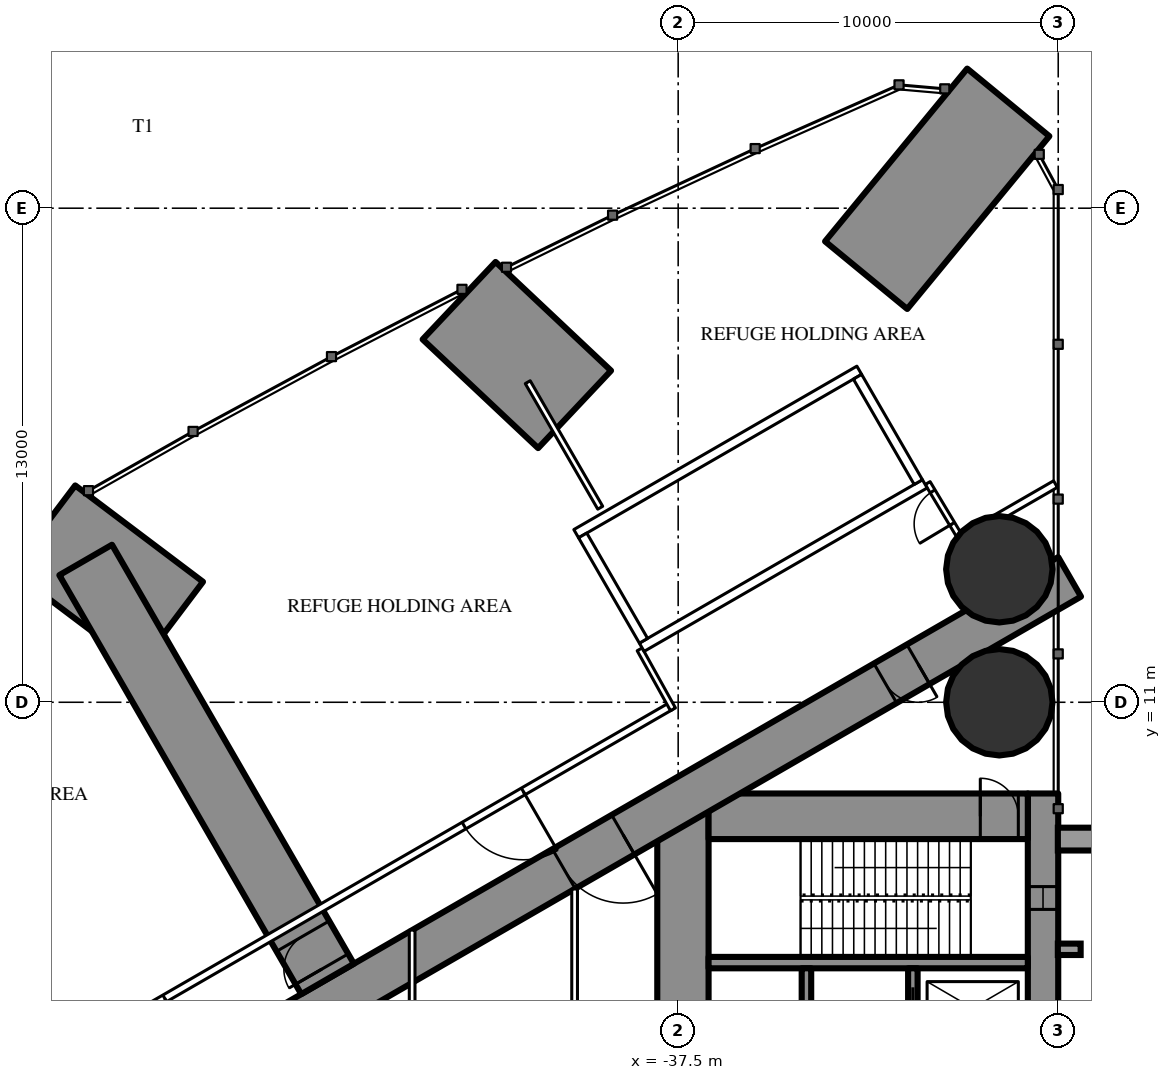
"""IFC4 building model, lengths in metres.
Left out: names, types, materials, properties, quantities, classifications, styles, units other than length and angle.
Written with IfcOpenShell. Run it as: python <this file> out.ifc"""

import sys

from ifc_helpers import new_model, si_unit, direction, frame, frame_2d, origin, origin_2d, place, context, subcontext, project, spatial, rectangle, hollow_circle, extrude, element, fill, save


model = new_model("IFC4")
c1 = context("Model", 3, precision=1e-05, world=origin(), true_north=direction((0.0, 1.0)))
c2 = subcontext(c1, "Body", "Model", "MODEL_VIEW")
j1 = project(units=[si_unit("LENGTHUNIT", "METRE"), si_unit("PLANEANGLEUNIT", "RADIAN")], contexts=[c1])
p1 = place(None, origin())
s1 = spatial("IfcSite", under=j1, at=p1, CompositionType="ELEMENT")
p2 = place(p1, origin())
s2 = spatial("IfcBuilding", under=s1, at=p2, CompositionType="ELEMENT")
p3 = place(p2, frame((0.0, 0.0, 81.0)))
s3 = spatial("IfcBuildingStorey", under=s2, at=p3, CompositionType="ELEMENT", Elevation=81.0)
p4 = place(p3, frame((-28.814, 26.784, 0.0), z_axis=(0.0, 0.0, 1.0), x_axis=(-0.635272533776, -0.77228803424, 0.0)))
e1 = element("IfcWall", 1, at=p4, inside=s3, PredefinedType="SHEAR", context=c2, shape_type="SweptSolid", body=[
    extrude(rectangle(XDim=5.887, YDim=2.8, at=frame_2d((2.944, 0.0))), origin(), (0.0, 0.0, 1.0), 6.0),
])
for number, where, z_axis, x_axis in (
    (2, (-29.05, 11.0, 0.0), (0.0, 0.0, 1.0), (1.0, 0.0, 0.0)),
    (3, (-29.05, 14.5, 0.0), (0.0, 0.0, 1.0), (1.0, 0.0, 0.0)),
):
    element("IfcColumn", number, at=place(p3, frame(where, z_axis=z_axis, x_axis=x_axis)), inside=s3, PredefinedType="COLUMN", context=c2, shape_type="SweptSolid", body=[
        extrude(hollow_circle(Radius=1.4, WallThickness=0.12, at=origin_2d()), origin(), (0.0, 0.0, 1.0), 6.0),
    ])
p5 = place(p3, frame((-43.265, 21.567, 0.0), z_axis=(0.0, 0.0, 1.0), x_axis=(0.728105540353, -0.685465040762, 0.0)))
e4 = element("IfcWall", 4, at=p5, inside=s3, PredefinedType="SHEAR", context=c2, shape_type="SweptSolid", body=[
    extrude(rectangle(XDim=4.174, YDim=2.8, at=frame_2d((2.087, 0.0))), origin(), (0.0, 0.0, 1.0), 6.0),
])
p6 = place(p3, frame((-54.208, 15.588, 0.0), z_axis=(0.0, 0.0, 1.0), x_axis=(0.798432065831, -0.602084907843, 0.0)))
e5 = element("IfcWall", 5, at=p6, inside=s3, PredefinedType="SHEAR", context=c2, shape_type="SweptSolid", body=[
    extrude(rectangle(XDim=4.211, YDim=2.8, at=frame_2d((2.106, 0.0))), origin(), (0.0, 0.0, 1.0), 6.0),
])
p7 = place(p3, frame((-27.9, 8.6, 0.0), z_axis=(0.0, 0.0, 1.0), x_axis=(0.0, -1.0, 0.0)))
e6 = element("IfcWall", 6, at=p7, inside=s3, PredefinedType="SHEAR", context=c2, shape_type="SweptSolid", body=[
    extrude(rectangle(XDim=17.2, YDim=0.8, at=frame_2d((8.6, 0.0))), origin(), (0.0, 0.0, 1.0), 6.0),
])
p8 = place(p7, frame((2.45, 0.0, 0.6)))
e7 = element("IfcOpeningElement", 7, at=p8, cuts=e6, PredefinedType="OPENING", context=c2, shape_type="SweptSolid", body=[
    extrude(rectangle(XDim=0.6, YDim=4.5, at=frame_2d((0.3, 2.25))), frame((0.0, 0.41, 0.0), z_axis=(0.0, -1.0, 0.0), x_axis=(1.0, 0.0, 0.0)), (0.0, 0.0, 1.0), 0.82),
])
p9 = place(p7, frame((14.15, 0.0, 0.6)))
e8 = element("IfcOpeningElement", 8, at=p9, cuts=e6, PredefinedType="OPENING", context=c2, shape_type="SweptSolid", body=[
    extrude(rectangle(XDim=0.6, YDim=4.5, at=frame_2d((0.3, 2.25))), frame((0.0, 0.41, 0.0), z_axis=(0.0, -1.0, 0.0), x_axis=(1.0, 0.0, 0.0)), (0.0, 0.0, 1.0), 0.82),
])
p10 = place(p3, frame((-37.375, 8.6, 0.0), z_axis=(0.0, 0.0, 1.0), x_axis=(0.0, -1.0, 0.0)))
e9 = element("IfcWall", 9, at=p10, inside=s3, PredefinedType="SHEAR", context=c2, shape_type="SweptSolid", body=[
    extrude(rectangle(XDim=17.2, YDim=1.35, at=frame_2d((8.6, 0.0))), origin(), (0.0, 0.0, 1.0), 6.0),
])
p11 = place(p10, frame((7.7, 0.0, 0.0)))
e10 = element("IfcOpeningElement", 10, at=p11, cuts=e9, PredefinedType="OPENING", context=c2, shape_type="SweptSolid", body=[
    extrude(rectangle(XDim=1.8, YDim=2.2, at=frame_2d((0.9, 1.1))), frame((0.0, 0.685, 0.0), z_axis=(0.0, -1.0, 0.0), x_axis=(1.0, 0.0, 0.0)), (0.0, 0.0, 1.0), 1.37),
])
p12 = place(p3, frame((-28.3, 8.0, 0.0), z_axis=(0.0, 0.0, 1.0), x_axis=(-1.0, 0.0, 0.0)))
e11 = element("IfcWall", 11, at=p12, inside=s3, PredefinedType="SHEAR", context=c2, shape_type="SweptSolid", body=[
    extrude(rectangle(XDim=8.4, YDim=1.2, at=frame_2d((4.2, 0.0))), origin(), (0.0, 0.0, 1.0), 6.0),
])
p13 = place(p12, frame((0.25, 0.0, 0.0)))
e12 = element("IfcOpeningElement", 12, at=p13, cuts=e11, PredefinedType="OPENING", context=c2, shape_type="SweptSolid", body=[
    extrude(rectangle(XDim=1.0, YDim=2.2, at=frame_2d((0.5, 1.1))), frame((0.0, 0.61, 0.0), z_axis=(0.0, -1.0, 0.0), x_axis=(1.0, 0.0, 0.0)), (0.0, 0.0, 1.0), 1.22),
])
p14 = place(p3, frame((-28.3, 4.15, 0.0), z_axis=(0.0, 0.0, 1.0), x_axis=(-1.0, 0.0, 0.0)))
e13 = element("IfcWall", 13, at=p14, inside=s3, PredefinedType="SHEAR", context=c2, shape_type="SweptSolid", body=[
    extrude(rectangle(XDim=8.4, YDim=0.3, at=frame_2d((4.2, 0.0))), origin(), (0.0, 0.0, 1.0), 6.0),
])
p15 = place(p3, frame((-31.325, 4.0, 0.0), z_axis=(0.0, 0.0, 1.0), x_axis=(0.0, -1.0, 0.0)))
e14 = element("IfcWall", 14, at=p15, inside=s3, PredefinedType="SHEAR", context=c2, shape_type="SweptSolid", body=[
    extrude(rectangle(XDim=2.1, YDim=0.25, at=frame_2d((1.05, 0.0))), origin(), (0.0, 0.0, 1.0), 6.0),
])
p16 = place(p15, frame((0.5, 0.0, 0.0)))
e15 = element("IfcOpeningElement", 15, at=p16, cuts=e14, PredefinedType="OPENING", context=c2, shape_type="SweptSolid", body=[
    extrude(rectangle(XDim=1.1, YDim=2.2, at=frame_2d((0.55, 1.1))), frame((0.0, 0.135, 0.0), z_axis=(0.0, -1.0, 0.0), x_axis=(1.0, 0.0, 0.0)), (0.0, 0.0, 1.0), 0.27),
])
p17 = place(p3, frame((-34.125, 4.0, 0.0), z_axis=(0.0, 0.0, 1.0), x_axis=(0.0, -1.0, 0.0)))
e16 = element("IfcWall", 16, at=p17, inside=s3, PredefinedType="SHEAR", context=c2, shape_type="SweptSolid", body=[
    extrude(rectangle(XDim=2.35, YDim=0.25, at=frame_2d((1.175, 0.0))), origin(), (0.0, 0.0, 1.0), 6.0),
])
p18 = place(p17, frame((0.875, 0.0, 0.0)))
e17 = element("IfcOpeningElement", 17, at=p18, cuts=e16, PredefinedType="OPENING", context=c2, shape_type="SweptSolid", body=[
    extrude(rectangle(XDim=0.6, YDim=2.0, at=frame_2d((0.3, 1.0))), frame((0.0, 0.135, 0.0), z_axis=(0.0, -1.0, 0.0), x_axis=(1.0, 0.0, 0.0)), (0.0, 0.0, 1.0), 0.27),
])
p19 = place(p3, frame((-27.2, 14.3, 0.0), z_axis=(0.0, 0.0, 1.0), x_axis=(-0.866026593062, -0.499997940104, 0.0)))
e18 = element("IfcWall", 18, at=p19, inside=s3, PredefinedType="SHEAR", context=c2, shape_type="SweptSolid", body=[
    extrude(rectangle(XDim=28.946, YDim=1.2, at=frame_2d((14.473, 0.0))), origin(), (0.0, 0.0, 1.0), 6.0),
])
p20 = place(p19, frame((4.6, 0.0, 0.0)))
e19 = element("IfcOpeningElement", 19, at=p20, cuts=e18, PredefinedType="OPENING", context=c2, shape_type="SweptSolid", body=[
    extrude(rectangle(XDim=1.0, YDim=2.2, at=frame_2d((0.5, 1.1))), frame((0.0, 0.61, 0.0), z_axis=(0.0, -1.0, 0.0), x_axis=(1.0, 0.0, 0.0)), (0.0, 0.0, 1.0), 1.22),
])
p21 = place(p19, frame((13.568, 0.0, 0.0)))
e20 = element("IfcOpeningElement", 20, at=p21, cuts=e18, PredefinedType="OPENING", context=c2, shape_type="SweptSolid", body=[
    extrude(rectangle(XDim=1.8, YDim=2.2, at=frame_2d((0.9, 1.1))), frame((0.0, 0.61, 0.0), z_axis=(0.0, -1.0, 0.0), x_axis=(1.0, 0.0, 0.0)), (0.0, 0.0, 1.0), 1.22),
])
p22 = place(p3, frame((-46.725, 3.72, 0.0), z_axis=(0.0, 0.0, 1.0), x_axis=(-0.500000237956, 0.866025266401, 0.0)))
e21 = element("IfcWall", 21, at=p22, inside=s3, PredefinedType="SHEAR", context=c2, shape_type="SweptSolid", body=[
    extrude(rectangle(XDim=12.73, YDim=1.6, at=frame_2d((6.365, 0.0))), origin(), (0.0, 0.0, 1.0), 6.0),
])
p23 = place(p22, frame((0.3, 0.0, 0.0)))
e22 = element("IfcOpeningElement", 22, at=p23, cuts=e21, PredefinedType="OPENING", context=c2, shape_type="SweptSolid", body=[
    extrude(rectangle(XDim=1.0, YDim=2.2, at=frame_2d((0.5, 1.1))), frame((0.0, 0.81, 0.0), z_axis=(0.0, -1.0, 0.0), x_axis=(1.0, 0.0, 0.0)), (0.0, 0.0, 1.0), 1.62),
])
p24 = place(p3, frame((-39.551, 16.119, 0.0), z_axis=(0.0, 0.0, 1.0), x_axis=(-0.500014214979, 0.866017196607, 0.0)))
e23 = element("IfcWall", 23, at=p24, inside=s3, PredefinedType="PARTITIONING", context=c2, shape_type="SweptSolid", body=[
    extrude(rectangle(XDim=3.815, YDim=0.15, at=frame_2d((1.907, 0.0))), origin(), (0.0, 0.0, 1.0), 5.75),
])
p25 = place(p3, frame((-27.572, 16.741, 0.0), z_axis=(0.0, 0.0, 1.0), x_axis=(-0.866034618596, -0.499984039138, 0.0)))
e24 = element("IfcWall", 24, at=p25, inside=s3, PredefinedType="PARTITIONING", context=c2, shape_type="SweptSolid", body=[
    extrude(rectangle(XDim=2.854, YDim=0.2, at=frame_2d((1.427, 0.0))), origin(), (0.0, 0.0, 1.0), 5.75),
])
p26 = place(p3, frame((-37.7, 10.894, 0.0), z_axis=(0.0, 0.0, 1.0), x_axis=(-0.866027905338, -0.499995667157, 0.0)))
e25 = element("IfcWall", 25, at=p26, inside=s3, PredefinedType="PARTITIONING", context=c2, shape_type="SweptSolid", body=[
    extrude(rectangle(XDim=21.787, YDim=0.2, at=frame_2d((10.894, 0.0))), origin(), (0.0, 0.0, 1.0), 5.75),
])
p27 = place(p26, frame((15.369, 0.0, 0.0)))
e26 = element("IfcOpeningElement", 26, at=p27, cuts=e25, PredefinedType="OPENING", context=c2, shape_type="SweptSolid", body=[
    extrude(rectangle(XDim=1.8, YDim=2.2, at=frame_2d((0.9, 1.1))), frame((0.0, 0.11, 0.0), z_axis=(0.0, -1.0, 0.0), x_axis=(1.0, 0.0, 0.0)), (0.0, 0.0, 1.0), 0.22),
])
p28 = place(p26, frame((4.476, 0.0, 0.0)))
e27 = element("IfcOpeningElement", 27, at=p28, cuts=e25, PredefinedType="OPENING", context=c2, shape_type="SweptSolid", body=[
    extrude(rectangle(XDim=1.8, YDim=2.2, at=frame_2d((0.9, 1.1))), frame((0.0, 0.11, 0.0), z_axis=(0.0, -1.0, 0.0), x_axis=(1.0, 0.0, 0.0)), (0.0, 0.0, 1.0), 0.22),
])
p29 = place(p3, frame((-30.007, 15.219, 0.0), z_axis=(0.0, 0.0, 1.0), x_axis=(-0.514296815006, 0.857612258585, 0.0)))
e28 = element("IfcWall", 28, at=p29, inside=s3, PredefinedType="PARTITIONING", context=c2, shape_type="SweptSolid", body=[
    extrude(rectangle(XDim=1.805, YDim=0.15, at=frame_2d((0.902, 0.0))), origin(), (0.0, 0.0, 1.0), 2.75),
])
p30 = place(p29, frame((0.552, 0.0, 0.0)))
e29 = element("IfcOpeningElement", 29, at=p30, cuts=e28, PredefinedType="OPENING", context=c2, shape_type="SweptSolid", body=[
    extrude(rectangle(XDim=1.0, YDim=2.2, at=frame_2d((0.5, 1.1))), frame((0.0, 0.085, 0.0), z_axis=(0.0, -1.0, 0.0), x_axis=(1.0, 0.0, 0.0)), (0.0, 0.0, 1.0), 0.17),
])
p31 = place(p3, frame((-38.513, 12.392, 0.0), z_axis=(0.0, 0.0, 1.0), x_axis=(0.485585508183, -0.874189175317, 0.0)))
e30 = element("IfcWall", 30, at=p31, inside=s3, PredefinedType="PARTITIONING", context=c2, shape_type="SweptSolid", body=[
    extrude(rectangle(XDim=1.805, YDim=0.15, at=frame_2d((0.902, 0.0))), origin(), (0.0, 0.0, 1.0), 5.75),
])
p32 = place(p3, frame((-40.225, 6.087, 0.0), z_axis=(0.0, 0.0, 1.0), x_axis=(0.0, -1.0, 0.0)))
e31 = element("IfcWall", 31, at=p32, inside=s3, PredefinedType="PARTITIONING", context=c2, shape_type="SweptSolid", body=[
    extrude(rectangle(XDim=12.174, YDim=0.15, at=frame_2d((6.087, 0.0))), origin(), (0.0, 0.0, 1.0), 5.75),
])
p33 = place(p32, frame((5.187, 0.0, 0.0)))
e32 = element("IfcOpeningElement", 32, at=p33, cuts=e31, PredefinedType="OPENING", context=c2, shape_type="SweptSolid", body=[
    extrude(rectangle(XDim=1.8, YDim=2.2, at=frame_2d((0.9, 1.1))), frame((0.0, 0.085, 0.0), z_axis=(0.0, -1.0, 0.0), x_axis=(1.0, 0.0, 0.0)), (0.0, 0.0, 1.0), 0.17),
])
p34 = place(p3, frame((-44.5, 5.005, 0.0), z_axis=(0.0, 0.0, 1.0), x_axis=(0.0, -1.0, 0.0)))
e33 = element("IfcWall", 33, at=p34, inside=s3, PredefinedType="PARTITIONING", context=c2, shape_type="SweptSolid", body=[
    extrude(rectangle(XDim=10.009, YDim=0.15, at=frame_2d((5.005, 0.0))), origin(), (0.0, 0.0, 1.0), 4.45),
])
p35 = place(p34, frame((4.505, 0.0, 0.0)))
e34 = element("IfcOpeningElement", 34, at=p35, cuts=e33, PredefinedType="OPENING", context=c2, shape_type="SweptSolid", body=[
    extrude(rectangle(XDim=1.0, YDim=2.2, at=frame_2d((0.5, 1.1))), frame((0.0, 0.085, 0.0), z_axis=(0.0, -1.0, 0.0), x_axis=(1.0, 0.0, 0.0)), (0.0, 0.0, 1.0), 0.17),
])
for number, where, z_axis, x_axis in (
    (35, (-31.01, 16.747, 0.0), (0.0, 0.0, 1.0), (-0.866, -0.5, 0.0)),
    (36, (-32.736, 19.736, 0.0), (0.0, 0.0, 1.0), (-0.866, -0.5, 0.0)),
):
    element("IfcWall", number, at=place(p3, frame(where, z_axis=z_axis, x_axis=x_axis)), inside=s3, PredefinedType="PARTITIONING", context=c2, shape_type="SweptSolid", body=[
        extrude(rectangle(XDim=8.6, YDim=0.25, at=frame_2d((4.3, 0.0))), origin(), (0.0, 0.0, 1.0), 5.75),
    ])
p36 = place(p3, frame((-31.181, 16.793, 0.0), z_axis=(0.0, 0.0, 1.0), x_axis=(-0.499929347863, 0.866066190972, 0.0)))
e37 = element("IfcWall", 37, at=p36, inside=s3, PredefinedType="PARTITIONING", context=c2, shape_type="SweptSolid", body=[
    extrude(rectangle(XDim=3.201, YDim=0.25, at=frame_2d((1.6, 0.0))), origin(), (0.0, 0.0, 1.0), 2.75),
])
p37 = place(p3, frame((-38.413, 12.618, 0.0), z_axis=(0.0, 0.0, 1.0), x_axis=(-0.499872130319, 0.866099216793, 0.0)))
e38 = element("IfcWall", 38, at=p37, inside=s3, PredefinedType="PARTITIONING", context=c2, shape_type="SweptSolid", body=[
    extrude(rectangle(XDim=3.2, YDim=0.25, at=frame_2d((1.6, 0.0))), origin(), (0.0, 0.0, 1.0), 5.75),
])
p38 = place(p23, origin())
e39 = element("IfcDoor", 39, at=p38, inside=s3, OperationType="SINGLE_SWING_LEFT", PredefinedType="DOOR", context=c2, shape_type="SweptSolid", body=[
    extrude(rectangle(XDim=1.0, YDim=2.2, at=frame_2d((0.5, 1.1))), frame((0.0, 0.025, 0.0), z_axis=(0.0, -1.0, 0.0), x_axis=(1.0, 0.0, 0.0)), (0.0, 0.0, 1.0), 0.05),
])
fill(e22, e39)
p39 = place(p27, origin())
e40 = element("IfcDoor", 40, at=p39, inside=s3, OperationType="DOUBLE_DOOR_SINGLE_SWING", PredefinedType="DOOR", context=c2, shape_type="SweptSolid", body=[
    extrude(rectangle(XDim=1.8, YDim=2.2, at=frame_2d((0.9, 1.1))), frame((0.0, 0.025, 0.0), z_axis=(0.0, -1.0, 0.0), x_axis=(1.0, 0.0, 0.0)), (0.0, 0.0, 1.0), 0.05),
])
fill(e26, e40)
p40 = place(p30, origin())
e41 = element("IfcDoor", 41, at=p40, inside=s3, OperationType="SINGLE_SWING_LEFT", PredefinedType="DOOR", context=c2, shape_type="SweptSolid", body=[
    extrude(rectangle(XDim=1.0, YDim=2.2, at=frame_2d((0.5, 1.1))), frame((0.0, 0.025, 0.0), z_axis=(0.0, -1.0, 0.0), x_axis=(1.0, 0.0, 0.0)), (0.0, 0.0, 1.0), 0.05),
])
fill(e29, e41)
p41 = place(p28, origin())
e42 = element("IfcDoor", 42, at=p41, inside=s3, OperationType="DOUBLE_DOOR_SINGLE_SWING", PredefinedType="DOOR", context=c2, shape_type="SweptSolid", body=[
    extrude(rectangle(XDim=1.8, YDim=2.2, at=frame_2d((0.9, 1.1))), frame((0.0, 0.025, 0.0), z_axis=(0.0, -1.0, 0.0), x_axis=(1.0, 0.0, 0.0)), (0.0, 0.0, 1.0), 0.05),
])
fill(e27, e42)
p42 = place(p20, origin())
e43 = element("IfcDoor", 43, at=p42, inside=s3, OperationType="SINGLE_SWING_LEFT", PredefinedType="DOOR", context=c2, shape_type="SweptSolid", body=[
    extrude(rectangle(XDim=1.0, YDim=2.2, at=frame_2d((0.5, 1.1))), frame((0.0, 0.025, 0.0), z_axis=(0.0, -1.0, 0.0), x_axis=(1.0, 0.0, 0.0)), (0.0, 0.0, 1.0), 0.05),
])
fill(e19, e43)
p43 = place(p21, origin())
e44 = element("IfcDoor", 44, at=p43, inside=s3, OperationType="DOUBLE_DOOR_SINGLE_SWING", PredefinedType="DOOR", context=c2, shape_type="SweptSolid", body=[
    extrude(rectangle(XDim=1.8, YDim=2.2, at=frame_2d((0.9, 1.1))), frame((0.0, 0.025, 0.0), z_axis=(0.0, -1.0, 0.0), x_axis=(1.0, 0.0, 0.0)), (0.0, 0.0, 1.0), 0.05),
])
fill(e20, e44)
p44 = place(p13, origin())
e45 = element("IfcDoor", 45, at=p44, inside=s3, OperationType="SINGLE_SWING_RIGHT", PredefinedType="DOOR", context=c2, shape_type="SweptSolid", body=[
    extrude(rectangle(XDim=1.0, YDim=2.2, at=frame_2d((0.5, 1.1))), frame((0.0, 0.025, 0.0), z_axis=(0.0, -1.0, 0.0), x_axis=(1.0, 0.0, 0.0)), (0.0, 0.0, 1.0), 0.05),
])
fill(e12, e45)
p45 = place(p16, origin())
e46 = element("IfcDoor", 46, at=p45, inside=s3, OperationType="SLIDING_TO_LEFT", PredefinedType="USERDEFINED", context=c2, shape_type="SweptSolid", body=[
    extrude(rectangle(XDim=1.1, YDim=2.2, at=frame_2d((0.55, 1.1))), frame((0.0, 0.025, 0.0), z_axis=(0.0, -1.0, 0.0), x_axis=(1.0, 0.0, 0.0)), (0.0, 0.0, 1.0), 0.05),
])
fill(e15, e46)
p46 = place(p8, origin())
e47 = element("IfcWindow", 47, at=p46, inside=s3, PartitioningType="SINGLE_PANEL", PredefinedType="WINDOW", context=c2, shape_type="SweptSolid", body=[
    extrude(rectangle(XDim=0.6, YDim=4.5, at=frame_2d((0.3, 2.25))), frame((0.0, 0.03, 0.0), z_axis=(0.0, -1.0, 0.0), x_axis=(1.0, 0.0, 0.0)), (0.0, 0.0, 1.0), 0.06),
])
fill(e7, e47)
save(model, sys.argv[1])
